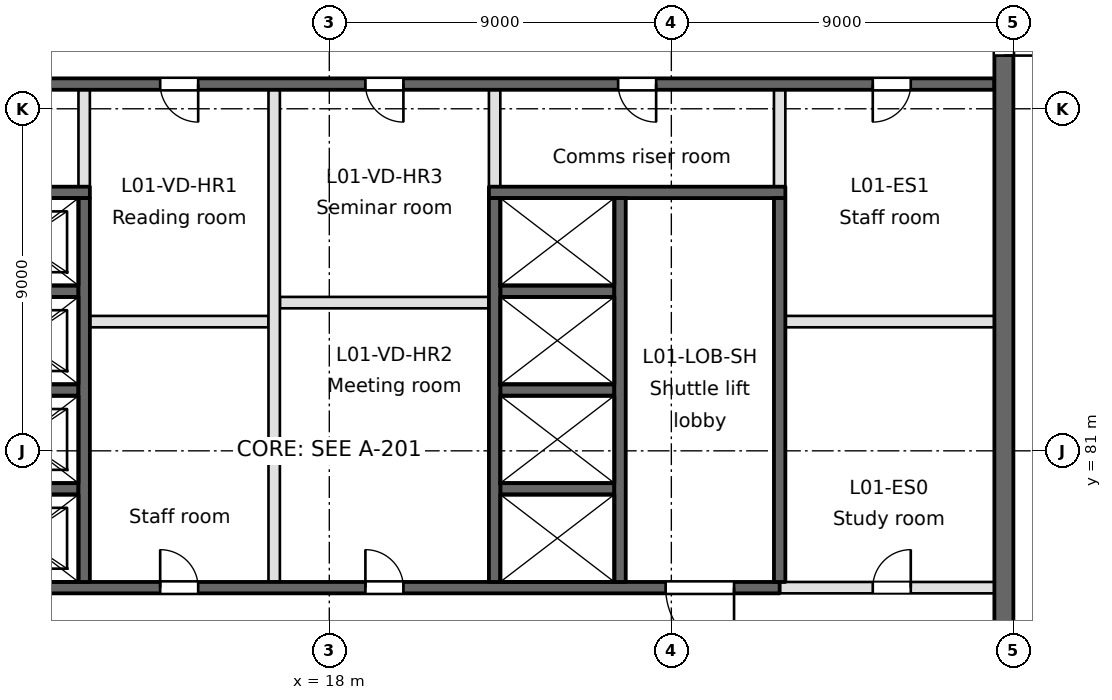
"""IFC4 building model, lengths in metres.
Left out: names, types, materials, properties, quantities, classifications, styles, units other than length and angle.
Written with IfcOpenShell. Run it as: python <this file> out.ifc"""

import sys

from ifc_helpers import new_model, si_unit, direction, frame, frame_2d, origin, place, context, subcontext, project, spatial, rectangle, extrude, element, fill, save


model = new_model("IFC4")
c1 = context("Model", 3, precision=1e-05, world=origin(), true_north=direction((0.0, 1.0)))
c2 = subcontext(c1, "Body", "Model", "MODEL_VIEW")
j1 = project(units=[si_unit("LENGTHUNIT", "METRE"), si_unit("PLANEANGLEUNIT", "RADIAN")], contexts=[c1])
p1 = place(None, origin())
s1 = spatial("IfcSite", under=j1, at=p1, CompositionType="ELEMENT")
p2 = place(p1, origin())
s2 = spatial("IfcBuilding", under=s1, at=p2, CompositionType="ELEMENT")
p3 = place(p2, frame((0.0, 0.0, 6.0)))
s3 = spatial("IfcBuildingStorey", under=s2, at=p3, CompositionType="ELEMENT", Elevation=6.0)
p4 = place(p3, frame((0.9, 77.4, -0.35), z_axis=(0.0, 0.0, 1.0), x_axis=(1.0, 0.0, 0.0)))
e1 = element("IfcWall", 1, at=p4, inside=s3, PredefinedType="SOLIDWALL", context=c2, shape_type="SweptSolid", body=[
    extrude(rectangle(XDim=28.95, YDim=0.3, at=frame_2d((14.475, 0.0))), origin(), (0.0, 0.0, 1.0), 5.4),
])
p5 = place(p4, frame((4.35, 0.0, 0.35)))
e2 = element("IfcOpeningElement", 2, at=p5, cuts=e1, PredefinedType="OPENING", context=c2, shape_type="SweptSolid", body=[
    extrude(rectangle(XDim=1.8, YDim=2.1, at=frame_2d((0.9, 1.05))), frame((0.0, 0.15, 0.0), z_axis=(0.0, -1.0, 0.0), x_axis=(1.0, 0.0, 0.0)), (0.0, 0.0, 1.0), 0.3),
])
p6 = place(p4, frame((25.95, 0.0, 0.35)))
e3 = element("IfcOpeningElement", 3, at=p6, cuts=e1, PredefinedType="OPENING", context=c2, shape_type="SweptSolid", body=[
    extrude(rectangle(XDim=1.8, YDim=2.1, at=frame_2d((0.9, 1.05))), frame((0.0, 0.15, 0.0), z_axis=(0.0, -1.0, 0.0), x_axis=(1.0, 0.0, 0.0)), (0.0, 0.0, 1.0), 0.3),
])
p7 = place(p4, frame((12.65, 0.0, 0.35)))
e4 = element("IfcOpeningElement", 4, at=p7, cuts=e1, PredefinedType="OPENING", context=c2, shape_type="SweptSolid", body=[
    extrude(rectangle(XDim=1.0, YDim=2.1, at=frame_2d((0.5, 1.05))), frame((0.0, 0.15, 0.0), z_axis=(0.0, -1.0, 0.0), x_axis=(1.0, 0.0, 0.0)), (0.0, 0.0, 1.0), 0.3),
])
p8 = place(p4, frame((18.05, 0.0, 0.35)))
e5 = element("IfcOpeningElement", 5, at=p8, cuts=e1, PredefinedType="OPENING", context=c2, shape_type="SweptSolid", body=[
    extrude(rectangle(XDim=1.0, YDim=2.1, at=frame_2d((0.5, 1.05))), frame((0.0, 0.15, 0.0), z_axis=(0.0, -1.0, 0.0), x_axis=(1.0, 0.0, 0.0)), (0.0, 0.0, 1.0), 0.3),
])
p9 = place(p3, frame((29.85, 77.4, 0.0), z_axis=(0.0, 0.0, 1.0), x_axis=(1.0, 0.0, 0.0)))
e6 = element("IfcWall", 6, at=p9, inside=s3, PredefinedType="PARTITIONING", context=c2, shape_type="SweptSolid", body=[
    extrude(rectangle(XDim=5.65, YDim=0.3, at=frame_2d((2.825, 0.0))), origin(), (0.0, 0.0, 1.0), 5.05),
])
p10 = place(p9, frame((2.45, 0.0, 0.0)))
e7 = element("IfcOpeningElement", 7, at=p10, cuts=e6, PredefinedType="OPENING", context=c2, shape_type="SweptSolid", body=[
    extrude(rectangle(XDim=1.0, YDim=2.1, at=frame_2d((0.5, 1.05))), frame((0.0, 0.15, 0.0), z_axis=(0.0, -1.0, 0.0), x_axis=(1.0, 0.0, 0.0)), (0.0, 0.0, 1.0), 0.3),
])
for number, where, z_axis, x_axis in (
    (8, (8.4, 80.0, -0.35), (0.0, 0.0, 1.0), (1.0, 0.0, 0.0)),
    (9, (22.5, 80.0, -0.35), (0.0, 0.0, 1.0), (1.0, 0.0, 0.0)),
    (10, (8.4, 82.6, -0.35), (0.0, 0.0, 1.0), (1.0, 0.0, 0.0)),
    (11, (22.5, 82.6, -0.35), (0.0, 0.0, 1.0), (1.0, 0.0, 0.0)),
):
    element("IfcWall", number, at=place(p3, frame(where, z_axis=z_axis, x_axis=x_axis)), inside=s3, PredefinedType="SOLIDWALL", context=c2, shape_type="SweptSolid", body=[
        extrude(rectangle(XDim=3.0, YDim=0.3, at=frame_2d((1.5, 0.0))), origin(), (0.0, 0.0, 1.0), 5.4),
    ])
p11 = place(p3, frame((11.7, 84.4, 0.0), z_axis=(0.0, 0.0, 1.0), x_axis=(1.0, 0.0, 0.0)))
e12 = element("IfcWall", 12, at=p11, inside=s3, PredefinedType="PARTITIONING", context=c2, shape_type="SweptSolid", body=[
    extrude(rectangle(XDim=4.7, YDim=0.3, at=frame_2d((2.35, 0.0))), origin(), (0.0, 0.0, 1.0), 5.05),
])
for number, where, z_axis, x_axis in (
    (13, (30.0, 84.4, 0.0), (0.0, 0.0, 1.0), (1.0, 0.0, 0.0)),
    (14, (16.7, 84.9, 0.0), (0.0, 0.0, 1.0), (1.0, 0.0, 0.0)),
):
    element("IfcWall", number, at=place(p3, frame(where, z_axis=z_axis, x_axis=x_axis)), inside=s3, PredefinedType="PARTITIONING", context=c2, shape_type="SweptSolid", body=[
        extrude(rectangle(XDim=5.5, YDim=0.3, at=frame_2d((2.75, 0.0))), origin(), (0.0, 0.0, 1.0), 5.05),
    ])
for number, where, z_axis, x_axis in (
    (15, (8.4, 85.2, -0.35), (0.0, 0.0, 1.0), (1.0, 0.0, 0.0)),
    (16, (22.5, 85.2, -0.35), (0.0, 0.0, 1.0), (1.0, 0.0, 0.0)),
):
    element("IfcWall", number, at=place(p3, frame(where, z_axis=z_axis, x_axis=x_axis)), inside=s3, PredefinedType="SOLIDWALL", context=c2, shape_type="SweptSolid", body=[
        extrude(rectangle(XDim=3.0, YDim=0.3, at=frame_2d((1.5, 0.0))), origin(), (0.0, 0.0, 1.0), 5.4),
    ])
p12 = place(p3, frame((0.9, 87.8, -0.35), z_axis=(0.0, 0.0, 1.0), x_axis=(1.0, 0.0, 0.0)))
e17 = element("IfcWall", 17, at=p12, inside=s3, PredefinedType="SOLIDWALL", context=c2, shape_type="SweptSolid", body=[
    extrude(rectangle(XDim=10.8, YDim=0.3, at=frame_2d((5.4, 0.0))), origin(), (0.0, 0.0, 1.0), 5.4),
])
p13 = place(p3, frame((22.2, 87.8, -0.35), z_axis=(0.0, 0.0, 1.0), x_axis=(1.0, 0.0, 0.0)))
e18 = element("IfcWall", 18, at=p13, inside=s3, PredefinedType="SOLIDWALL", context=c2, shape_type="SweptSolid", body=[
    extrude(rectangle(XDim=7.8, YDim=0.3, at=frame_2d((3.9, 0.0))), origin(), (0.0, 0.0, 1.0), 5.4),
])
p14 = place(p3, frame((0.9, 90.65, -0.35), z_axis=(0.0, 0.0, 1.0), x_axis=(1.0, 0.0, 0.0)))
e19 = element("IfcWall", 19, at=p14, inside=s3, PredefinedType="SOLIDWALL", context=c2, shape_type="SweptSolid", body=[
    extrude(rectangle(XDim=34.6, YDim=0.3, at=frame_2d((17.3, 0.0))), origin(), (0.0, 0.0, 1.0), 5.4),
])
p15 = place(p14, frame((4.75, 0.0, 0.35)))
e20 = element("IfcOpeningElement", 20, at=p15, cuts=e19, PredefinedType="OPENING", context=c2, shape_type="SweptSolid", body=[
    extrude(rectangle(XDim=1.0, YDim=2.1, at=frame_2d((0.5, 1.05))), frame((0.0, 0.15, 0.0), z_axis=(0.0, -1.0, 0.0), x_axis=(1.0, 0.0, 0.0)), (0.0, 0.0, 1.0), 0.3),
])
p16 = place(p14, frame((24.7, 0.0, 0.35)))
e21 = element("IfcOpeningElement", 21, at=p16, cuts=e19, PredefinedType="OPENING", context=c2, shape_type="SweptSolid", body=[
    extrude(rectangle(XDim=1.0, YDim=2.1, at=frame_2d((0.5, 1.05))), frame((0.0, 0.15, 0.0), z_axis=(0.0, -1.0, 0.0), x_axis=(1.0, 0.0, 0.0)), (0.0, 0.0, 1.0), 0.3),
])
p17 = place(p14, frame((12.65, 0.0, 0.35)))
e22 = element("IfcOpeningElement", 22, at=p17, cuts=e19, PredefinedType="OPENING", context=c2, shape_type="SweptSolid", body=[
    extrude(rectangle(XDim=1.0, YDim=2.1, at=frame_2d((0.5, 1.05))), frame((0.0, 0.15, 0.0), z_axis=(0.0, -1.0, 0.0), x_axis=(1.0, 0.0, 0.0)), (0.0, 0.0, 1.0), 0.3),
])
p18 = place(p14, frame((18.05, 0.0, 0.35)))
e23 = element("IfcOpeningElement", 23, at=p18, cuts=e19, PredefinedType="OPENING", context=c2, shape_type="SweptSolid", body=[
    extrude(rectangle(XDim=1.0, YDim=2.1, at=frame_2d((0.5, 1.05))), frame((0.0, 0.15, 0.0), z_axis=(0.0, -1.0, 0.0), x_axis=(1.0, 0.0, 0.0)), (0.0, 0.0, 1.0), 0.3),
])
p19 = place(p14, frame((31.4, 0.0, 0.35)))
e24 = element("IfcOpeningElement", 24, at=p19, cuts=e19, PredefinedType="OPENING", context=c2, shape_type="SweptSolid", body=[
    extrude(rectangle(XDim=1.0, YDim=2.1, at=frame_2d((0.5, 1.05))), frame((0.0, 0.15, 0.0), z_axis=(0.0, -1.0, 0.0), x_axis=(1.0, 0.0, 0.0)), (0.0, 0.0, 1.0), 0.3),
])
p20 = place(p3, frame((11.55, 77.55, -0.35), z_axis=(0.0, 0.0, 1.0), x_axis=(0.0, 1.0, 0.0)))
e25 = element("IfcWall", 25, at=p20, inside=s3, PredefinedType="SOLIDWALL", context=c2, shape_type="SweptSolid", body=[
    extrude(rectangle(XDim=10.1, YDim=0.3, at=frame_2d((5.05, 0.0))), origin(), (0.0, 0.0, 1.0), 5.4),
])
p21 = place(p3, frame((11.55, 87.95, 0.0), z_axis=(0.0, 0.0, 1.0), x_axis=(0.0, 1.0, 0.0)))
e26 = element("IfcWall", 26, at=p21, inside=s3, PredefinedType="PARTITIONING", context=c2, shape_type="SweptSolid", body=[
    extrude(rectangle(XDim=2.55, YDim=0.3, at=frame_2d((1.275, 0.0))), origin(), (0.0, 0.0, 1.0), 5.05),
])
p22 = place(p3, frame((16.55, 77.55, 0.0), z_axis=(0.0, 0.0, 1.0), x_axis=(0.0, 1.0, 0.0)))
e27 = element("IfcWall", 27, at=p22, inside=s3, PredefinedType="PARTITIONING", context=c2, shape_type="SweptSolid", body=[
    extrude(rectangle(XDim=12.95, YDim=0.3, at=frame_2d((6.475, 0.0))), origin(), (0.0, 0.0, 1.0), 5.05),
])
p23 = place(p3, frame((22.35, 77.55, -0.35), z_axis=(0.0, 0.0, 1.0), x_axis=(0.0, 1.0, 0.0)))
e28 = element("IfcWall", 28, at=p23, inside=s3, PredefinedType="SOLIDWALL", context=c2, shape_type="SweptSolid", body=[
    extrude(rectangle(XDim=10.1, YDim=0.3, at=frame_2d((5.05, 0.0))), origin(), (0.0, 0.0, 1.0), 5.4),
])
p24 = place(p3, frame((22.35, 87.95, 0.0), z_axis=(0.0, 0.0, 1.0), x_axis=(0.0, 1.0, 0.0)))
e29 = element("IfcWall", 29, at=p24, inside=s3, PredefinedType="PARTITIONING", context=c2, shape_type="SweptSolid", body=[
    extrude(rectangle(XDim=2.55, YDim=0.3, at=frame_2d((1.275, 0.0))), origin(), (0.0, 0.0, 1.0), 5.05),
])
for number, where, z_axis, x_axis in (
    (30, (25.65, 77.55, -0.35), (0.0, 0.0, 1.0), (0.0, 1.0, 0.0)),
    (31, (29.85, 77.55, -0.35), (0.0, 0.0, 1.0), (0.0, 1.0, 0.0)),
):
    element("IfcWall", number, at=place(p3, frame(where, z_axis=z_axis, x_axis=x_axis)), inside=s3, PredefinedType="SOLIDWALL", context=c2, shape_type="SweptSolid", body=[
        extrude(rectangle(XDim=10.1, YDim=0.3, at=frame_2d((5.05, 0.0))), origin(), (0.0, 0.0, 1.0), 5.4),
    ])
p25 = place(p3, frame((29.85, 87.95, 0.0), z_axis=(0.0, 0.0, 1.0), x_axis=(0.0, 1.0, 0.0)))
e32 = element("IfcWall", 32, at=p25, inside=s3, PredefinedType="PARTITIONING", context=c2, shape_type="SweptSolid", body=[
    extrude(rectangle(XDim=2.55, YDim=0.3, at=frame_2d((1.275, 0.0))), origin(), (0.0, 0.0, 1.0), 5.05),
])
p26 = place(p3, frame((35.75, 63.5, -0.35), z_axis=(0.0, 0.0, 1.0), x_axis=(0.0, 1.0, 0.0)))
e33 = element("IfcWall", 33, at=p26, inside=s3, PredefinedType="SOLIDWALL", context=c2, shape_type="SweptSolid", body=[
    extrude(rectangle(XDim=34.6, YDim=0.5, at=frame_2d((17.3, 0.0))), origin(), (0.0, 0.0, 1.0), 5.4),
])
p27 = place(p26, frame((9.7, 0.0, 0.35)))
e34 = element("IfcOpeningElement", 34, at=p27, cuts=e33, PredefinedType="OPENING", context=c2, shape_type="SweptSolid", body=[
    extrude(rectangle(XDim=2.4, YDim=2.1, at=frame_2d((1.2, 1.05))), frame((0.0, 0.25, 0.0), z_axis=(0.0, -1.0, 0.0), x_axis=(1.0, 0.0, 0.0)), (0.0, 0.0, 1.0), 0.5),
])
p28 = place(p26, frame((27.9, 0.0, 0.35)))
e35 = element("IfcOpeningElement", 35, at=p28, cuts=e33, PredefinedType="OPENING", context=c2, shape_type="SweptSolid", body=[
    extrude(rectangle(XDim=1.5, YDim=2.1, at=frame_2d((0.75, 1.05))), frame((0.0, 0.25, 0.0), z_axis=(0.0, -1.0, 0.0), x_axis=(1.0, 0.0, 0.0)), (0.0, 0.0, 1.0), 0.5),
])
p29 = place(p26, frame((1.5, 0.0, 0.35)))
e36 = element("IfcOpeningElement", 36, at=p29, cuts=e33, PredefinedType="OPENING", context=c2, shape_type="SweptSolid", body=[
    extrude(rectangle(XDim=1.2, YDim=2.1, at=frame_2d((0.6, 1.05))), frame((0.0, 0.25, 0.0), z_axis=(0.0, -1.0, 0.0), x_axis=(1.0, 0.0, 0.0)), (0.0, 0.0, 1.0), 0.5),
])
p30 = place(p6, frame((1.8, 0.0, 0.0), z_axis=(0.0, 0.0, 1.0), x_axis=(-1.0, 0.0, 0.0)))
e37 = element("IfcDoor", 37, at=p30, inside=s3, OperationType="SINGLE_SWING_LEFT", PredefinedType="DOOR", context=c2, shape_type="SweptSolid", body=[
    extrude(rectangle(XDim=1.8, YDim=2.1, at=frame_2d((0.9, 1.05))), frame((0.0, 0.025, 0.0), z_axis=(0.0, -1.0, 0.0), x_axis=(1.0, 0.0, 0.0)), (0.0, 0.0, 1.0), 0.05),
])
fill(e3, e37)
p31 = place(p28, frame((1.5, 0.0, 0.0), z_axis=(0.0, 0.0, 1.0), x_axis=(-1.0, 0.0, 0.0)))
e38 = element("IfcDoor", 38, at=p31, inside=s3, OperationType="SINGLE_SWING_RIGHT", PredefinedType="DOOR", context=c2, shape_type="SweptSolid", body=[
    extrude(rectangle(XDim=1.5, YDim=2.1, at=frame_2d((0.75, 1.05))), frame((0.0, 0.025, 0.0), z_axis=(0.0, -1.0, 0.0), x_axis=(1.0, 0.0, 0.0)), (0.0, 0.0, 1.0), 0.05),
])
fill(e35, e38)
p32 = place(p16, frame((1.0, 0.0, 0.0), z_axis=(0.0, 0.0, 1.0), x_axis=(-1.0, 0.0, 0.0)))
e39 = element("IfcDoor", 39, at=p32, inside=s3, OperationType="SINGLE_SWING_LEFT", PredefinedType="DOOR", context=c2, shape_type="SweptSolid", body=[
    extrude(rectangle(XDim=1.0, YDim=2.1, at=frame_2d((0.5, 1.05))), frame((0.0, 0.025, 0.0), z_axis=(0.0, -1.0, 0.0), x_axis=(1.0, 0.0, 0.0)), (0.0, 0.0, 1.0), 0.05),
])
fill(e21, e39)
p33 = place(p7, origin())
e40 = element("IfcDoor", 40, at=p33, inside=s3, OperationType="SINGLE_SWING_LEFT", PredefinedType="DOOR", context=c2, shape_type="SweptSolid", body=[
    extrude(rectangle(XDim=1.0, YDim=2.1, at=frame_2d((0.5, 1.05))), frame((0.0, 0.025, 0.0), z_axis=(0.0, -1.0, 0.0), x_axis=(1.0, 0.0, 0.0)), (0.0, 0.0, 1.0), 0.05),
])
fill(e4, e40)
p34 = place(p17, frame((1.0, 0.0, 0.0), z_axis=(0.0, 0.0, 1.0), x_axis=(-1.0, 0.0, 0.0)))
e41 = element("IfcDoor", 41, at=p34, inside=s3, OperationType="SINGLE_SWING_LEFT", PredefinedType="DOOR", context=c2, shape_type="SweptSolid", body=[
    extrude(rectangle(XDim=1.0, YDim=2.1, at=frame_2d((0.5, 1.05))), frame((0.0, 0.025, 0.0), z_axis=(0.0, -1.0, 0.0), x_axis=(1.0, 0.0, 0.0)), (0.0, 0.0, 1.0), 0.05),
])
fill(e22, e41)
p35 = place(p8, origin())
e42 = element("IfcDoor", 42, at=p35, inside=s3, OperationType="SINGLE_SWING_LEFT", PredefinedType="DOOR", context=c2, shape_type="SweptSolid", body=[
    extrude(rectangle(XDim=1.0, YDim=2.1, at=frame_2d((0.5, 1.05))), frame((0.0, 0.025, 0.0), z_axis=(0.0, -1.0, 0.0), x_axis=(1.0, 0.0, 0.0)), (0.0, 0.0, 1.0), 0.05),
])
fill(e5, e42)
p36 = place(p18, frame((1.0, 0.0, 0.0), z_axis=(0.0, 0.0, 1.0), x_axis=(-1.0, 0.0, 0.0)))
e43 = element("IfcDoor", 43, at=p36, inside=s3, OperationType="SINGLE_SWING_LEFT", PredefinedType="DOOR", context=c2, shape_type="SweptSolid", body=[
    extrude(rectangle(XDim=1.0, YDim=2.1, at=frame_2d((0.5, 1.05))), frame((0.0, 0.025, 0.0), z_axis=(0.0, -1.0, 0.0), x_axis=(1.0, 0.0, 0.0)), (0.0, 0.0, 1.0), 0.05),
])
fill(e23, e43)
p37 = place(p10, origin())
e44 = element("IfcDoor", 44, at=p37, inside=s3, OperationType="SINGLE_SWING_RIGHT", PredefinedType="DOOR", context=c2, shape_type="SweptSolid", body=[
    extrude(rectangle(XDim=1.0, YDim=2.1, at=frame_2d((0.5, 1.05))), frame((0.0, 0.025, 0.0), z_axis=(0.0, -1.0, 0.0), x_axis=(1.0, 0.0, 0.0)), (0.0, 0.0, 1.0), 0.05),
])
fill(e7, e44)
p38 = place(p19, frame((1.0, 0.0, 0.0), z_axis=(0.0, 0.0, 1.0), x_axis=(-1.0, 0.0, 0.0)))
e45 = element("IfcDoor", 45, at=p38, inside=s3, OperationType="SINGLE_SWING_RIGHT", PredefinedType="DOOR", context=c2, shape_type="SweptSolid", body=[
    extrude(rectangle(XDim=1.0, YDim=2.1, at=frame_2d((0.5, 1.05))), frame((0.0, 0.025, 0.0), z_axis=(0.0, -1.0, 0.0), x_axis=(1.0, 0.0, 0.0)), (0.0, 0.0, 1.0), 0.05),
])
fill(e24, e45)
save(model, sys.argv[1])
